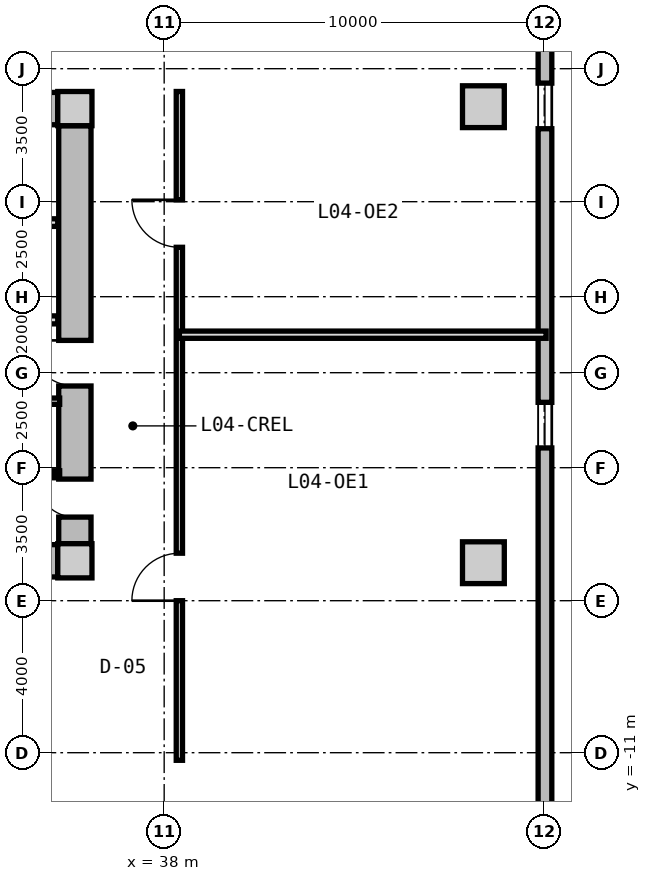
"""IFC4 building model, lengths in metres.
Left out: names, types, materials, properties, quantities, classifications, styles, units other than length and angle.
Written with IfcOpenShell. Run it as: python <this file> out.ifc"""

import sys

from ifc_helpers import new_model, si_unit, direction, frame, frame_2d, origin, origin_2d, place, context, subcontext, project, spatial, rectangle, extrude, source, transform, mapped, element, fill, save


model = new_model("IFC4")
c1 = context("Model", 3, precision=1e-05, world=origin(), true_north=direction((0.0, 1.0)))
c2 = subcontext(c1, "Body", "Model", "MODEL_VIEW")
j1 = project(units=[si_unit("LENGTHUNIT", "METRE"), si_unit("PLANEANGLEUNIT", "RADIAN")], contexts=[c1])
p1 = place(None, origin())
s1 = spatial("IfcSite", under=j1, at=p1, CompositionType="ELEMENT")
p2 = place(p1, origin())
s2 = spatial("IfcBuilding", under=s1, at=p2, CompositionType="ELEMENT")
p3 = place(p2, frame((0.0, 0.0, 16.8)))
s3 = spatial("IfcBuildingStorey", under=s2, at=p3, CompositionType="ELEMENT", Elevation=16.8)
m1 = source(origin(), c2, "Body", "SweptSolid", [
    extrude(rectangle(XDim=0.9, YDim=0.9, at=origin_2d()), origin(), (0.0, 0.0, 1.0), 4.8),
])
for number, where, z_axis, x_axis in (
    (1, (35.65, -5.95, 0.0), (0.0, 0.0, 1.0), (1.0, 0.0, 0.0)),
    (2, (35.65, 5.95, 0.0), (0.0, 0.0, 1.0), (1.0, 0.0, 0.0)),
):
    element("IfcColumn", number, at=place(p3, frame(where, z_axis=z_axis, x_axis=x_axis)), inside=s3, PredefinedType="COLUMN", context=c2, shape_type="MappedRepresentation", body=[
        mapped(m1, transform((0.0, 0.0, 0.0), x_axis=(1.0, 0.0, 0.0), y_axis=(0.0, 1.0, 0.0), z_axis=(0.0, 0.0, 1.0), scale=1.0)),
    ])
m2 = source(origin(), c2, "Body", "SweptSolid", [
    extrude(rectangle(XDim=14.4, YDim=0.85, at=frame_2d((7.2, 0.0))), origin(), (0.0, 0.0, 1.0), 4.38),
])
for number, where, z_axis, x_axis in (
    (3, (20.8, 5.95, 0.0), (0.0, 0.0, 1.0), (1.0, 0.0, 0.0)),
    (4, (35.2, -5.95, 0.0), (0.0, 0.0, 1.0), (-1.0, 0.0, 0.0)),
):
    element("IfcWall", number, at=place(p3, frame(where, z_axis=z_axis, x_axis=x_axis)), inside=s3, PredefinedType="SHEAR", context=c2, shape_type="MappedRepresentation", body=[
        mapped(m2, transform((0.0, 0.0, 0.0), x_axis=(1.0, 0.0, 0.0), y_axis=(0.0, 1.0, 0.0), z_axis=(0.0, 0.0, 1.0), scale=1.0)),
    ])
m3 = source(origin(), c2, "Body", "SweptSolid", [
    extrude(rectangle(XDim=11.0, YDim=0.85, at=frame_2d((5.5, 0.0))), origin(), (0.0, 0.0, 1.0), 4.38),
])
p4 = place(p3, frame((35.65, 5.5, 0.0), z_axis=(0.0, 0.0, 1.0), x_axis=(0.0, -1.0, 0.0)))
e5 = element("IfcWall", 5, at=p4, inside=s3, PredefinedType="SHEAR", context=c2, shape_type="MappedRepresentation", body=[
    mapped(m3, transform((0.0, 0.0, 0.0), x_axis=(1.0, 0.0, 0.0), y_axis=(0.0, 1.0, 0.0), z_axis=(0.0, 0.0, 1.0), scale=1.0)),
])
p5 = place(p4, frame((5.65, 0.0, 0.0)))
e6 = element("IfcOpeningElement", 6, at=p5, cuts=e5, PredefinedType="OPENING", context=c2, shape_type="SweptSolid", body=[
    extrude(rectangle(XDim=1.2, YDim=2.15, at=frame_2d((0.6, 1.075))), frame((0.0, 0.435, 0.0), z_axis=(0.0, -1.0, 0.0), x_axis=(1.0, 0.0, 0.0)), (0.0, 0.0, 1.0), 0.87),
])
p6 = place(p4, frame((9.3, 0.0, 0.0)))
e7 = element("IfcOpeningElement", 7, at=p6, cuts=e5, PredefinedType="OPENING", context=c2, shape_type="SweptSolid", body=[
    extrude(rectangle(XDim=1.0, YDim=2.1, at=frame_2d((0.5, 1.05))), frame((0.0, 0.435, 0.0), z_axis=(0.0, -1.0, 0.0), x_axis=(1.0, 0.0, 0.0)), (0.0, 0.0, 1.0), 0.87),
])
m4 = source(origin(), c2, "Body", "SweptSolid", [
    extrude(rectangle(XDim=1.1, YDim=1.1, at=origin_2d()), origin(), (0.0, 0.0, 1.0), 4.38),
])
for number, where, z_axis, x_axis in (
    (8, (46.4, -6.0, 0.0), (0.0, 0.0, 1.0), (1.0, 0.0, 0.0)),
    (9, (46.4, 6.0, 0.0), (0.0, 0.0, 1.0), (1.0, 0.0, 0.0)),
):
    element("IfcColumn", number, at=place(p3, frame(where, z_axis=z_axis, x_axis=x_axis)), inside=s3, PredefinedType="COLUMN", context=c2, shape_type="MappedRepresentation", body=[
        mapped(m4, transform((0.0, 0.0, 0.0), x_axis=(1.0, 0.0, 0.0), y_axis=(0.0, 1.0, 0.0), z_axis=(0.0, 0.0, 1.0), scale=1.0)),
    ])
m5 = source(origin(), c2, "Body", "SweptSolid", [
    extrude(rectangle(XDim=38.04, YDim=0.36, at=frame_2d((19.02, 0.0))), origin(), (0.0, 0.0, 1.0), 4.38),
])
p7 = place(p3, frame((48.02, 19.02, 0.0), z_axis=(0.0, 0.0, 1.0), x_axis=(0.0, -1.0, 0.0)))
e10 = element("IfcWall", 10, at=p7, inside=s3, PredefinedType="SOLIDWALL", context=c2, shape_type="MappedRepresentation", body=[
    mapped(m5, transform((0.0, 0.0, 0.0), x_axis=(1.0, 0.0, 0.0), y_axis=(0.0, 1.0, 0.0), z_axis=(0.0, 0.0, 1.0), scale=1.0)),
])
p8 = place(p7, frame((4.0, 0.0, 0.85)))
e11 = element("IfcOpeningElement", 11, at=p8, cuts=e10, PredefinedType="OPENING", context=c2, shape_type="SweptSolid", body=[
    extrude(rectangle(XDim=1.2, YDim=1.5, at=frame_2d((0.6, 0.75))), frame((0.0, 0.19, 0.0), z_axis=(0.0, -1.0, 0.0), x_axis=(1.0, 0.0, 0.0)), (0.0, 0.0, 1.0), 0.38),
])
p9 = place(p7, frame((12.4, 0.0, 0.85)))
e12 = element("IfcOpeningElement", 12, at=p9, cuts=e10, PredefinedType="OPENING", context=c2, shape_type="SweptSolid", body=[
    extrude(rectangle(XDim=1.2, YDim=1.5, at=frame_2d((0.6, 0.75))), frame((0.0, 0.19, 0.0), z_axis=(0.0, -1.0, 0.0), x_axis=(1.0, 0.0, 0.0)), (0.0, 0.0, 1.0), 0.38),
])
p10 = place(p7, frame((20.8, 0.0, 0.85)))
e13 = element("IfcOpeningElement", 13, at=p10, cuts=e10, PredefinedType="OPENING", context=c2, shape_type="SweptSolid", body=[
    extrude(rectangle(XDim=1.2, YDim=1.5, at=frame_2d((0.6, 0.75))), frame((0.0, 0.19, 0.0), z_axis=(0.0, -1.0, 0.0), x_axis=(1.0, 0.0, 0.0)), (0.0, 0.0, 1.0), 0.38),
])
m6 = source(origin(), c2, "Body", "SweptSolid", [
    extrude(rectangle(XDim=3.2, YDim=0.2, at=frame_2d((1.6, 0.0))), origin(), (0.0, 0.0, 1.0), 4.365),
])
p11 = place(p3, frame((32.0, 2.95, 0.0), z_axis=(0.0, 0.0, 1.0), x_axis=(1.0, 0.0, 0.0)))
e14 = element("IfcWall", 14, at=p11, inside=s3, PredefinedType="PARTITIONING", context=c2, shape_type="MappedRepresentation", body=[
    mapped(m6, transform((0.0, 0.0, 0.0), x_axis=(1.0, 0.0, 0.0), y_axis=(0.0, 1.0, 0.0), z_axis=(0.0, 0.0, 1.0), scale=1.0)),
])
m7 = source(origin(), c2, "Body", "SweptSolid", [
    extrude(rectangle(XDim=6.66, YDim=0.21, at=frame_2d((3.33, 0.0))), origin(), (0.0, 0.0, 1.0), 4.365),
])
p12 = place(p3, frame((28.54, 0.39, 0.0), z_axis=(0.0, 0.0, 1.0), x_axis=(1.0, 0.0, 0.0)))
e15 = element("IfcWall", 15, at=p12, inside=s3, PredefinedType="PARTITIONING", context=c2, shape_type="MappedRepresentation", body=[
    mapped(m7, transform((0.0, 0.0, 0.0), x_axis=(1.0, 0.0, 0.0), y_axis=(0.0, 1.0, 0.0), z_axis=(0.0, 0.0, 1.0), scale=1.0)),
])
p13 = place(p12, frame((1.0, 0.0, 0.0)))
e16 = element("IfcOpeningElement", 16, at=p13, cuts=e15, PredefinedType="OPENING", context=c2, shape_type="SweptSolid", body=[
    extrude(rectangle(XDim=1.2, YDim=2.15, at=frame_2d((0.6, 1.075))), frame((0.0, 0.115, 0.0), z_axis=(0.0, -1.0, 0.0), x_axis=(1.0, 0.0, 0.0)), (0.0, 0.0, 1.0), 0.23),
])
m8 = source(origin(), c2, "Body", "SweptSolid", [
    extrude(rectangle(XDim=2.7, YDim=0.165, at=frame_2d((1.35, 0.0))), origin(), (0.0, 0.0, 1.0), 4.365),
])
p14 = place(p3, frame((32.55, -1.75, 0.0), z_axis=(0.0, 0.0, 1.0), x_axis=(1.0, 0.0, 0.0)))
e17 = element("IfcWall", 17, at=p14, inside=s3, PredefinedType="PARTITIONING", context=c2, shape_type="MappedRepresentation", body=[
    mapped(m8, transform((0.0, 0.0, 0.0), x_axis=(1.0, 0.0, 0.0), y_axis=(0.0, 1.0, 0.0), z_axis=(0.0, 0.0, 1.0), scale=1.0)),
])
p15 = place(p14, frame((0.85, 0.0, 0.0)))
e18 = element("IfcOpeningElement", 18, at=p15, cuts=e17, PredefinedType="OPENING", context=c2, shape_type="SweptSolid", body=[
    extrude(rectangle(XDim=0.925, YDim=2.1, at=frame_2d((0.462, 1.05))), frame((0.0, 0.093, 0.0), z_axis=(0.0, -1.0, 0.0), x_axis=(1.0, 0.0, 0.0)), (0.0, 0.0, 1.0), 0.185),
])
m9 = source(origin(), c2, "Body", "SweptSolid", [
    extrude(rectangle(XDim=2.7, YDim=0.14, at=frame_2d((1.35, 0.0))), origin(), (0.0, 0.0, 1.0), 4.365),
])
p16 = place(p3, frame((32.55, -3.65, 0.0), z_axis=(0.0, 0.0, 1.0), x_axis=(1.0, 0.0, 0.0)))
e19 = element("IfcWall", 19, at=p16, inside=s3, PredefinedType="PARTITIONING", context=c2, shape_type="MappedRepresentation", body=[
    mapped(m9, transform((0.0, 0.0, 0.0), x_axis=(1.0, 0.0, 0.0), y_axis=(0.0, 1.0, 0.0), z_axis=(0.0, 0.0, 1.0), scale=1.0)),
])
m10 = source(origin(), c2, "Body", "SweptSolid", [
    extrude(rectangle(XDim=17.6, YDim=0.165, at=frame_2d((8.8, 0.0))), origin(), (0.0, 0.0, 1.0), 4.365),
])
p17 = place(p3, frame((38.4, -11.2, 0.0), z_axis=(0.0, 0.0, 1.0), x_axis=(0.0, 1.0, 0.0)))
e20 = element("IfcWall", 20, at=p17, inside=s3, PredefinedType="PARTITIONING", context=c2, shape_type="MappedRepresentation", body=[
    mapped(m10, transform((0.0, 0.0, 0.0), x_axis=(1.0, 0.0, 0.0), y_axis=(0.0, 1.0, 0.0), z_axis=(0.0, 0.0, 1.0), scale=1.0)),
])
p18 = place(p17, frame((4.2, 0.0, 0.0)))
e21 = element("IfcOpeningElement", 21, at=p18, cuts=e20, PredefinedType="OPENING", context=c2, shape_type="SweptSolid", body=[
    extrude(rectangle(XDim=1.25, YDim=2.2, at=frame_2d((0.625, 1.1))), frame((0.0, 0.093, 0.0), z_axis=(0.0, -1.0, 0.0), x_axis=(1.0, 0.0, 0.0)), (0.0, 0.0, 1.0), 0.185),
])
p19 = place(p17, frame((13.5, 0.0, 0.0)))
e22 = element("IfcOpeningElement", 22, at=p19, cuts=e20, PredefinedType="OPENING", context=c2, shape_type="SweptSolid", body=[
    extrude(rectangle(XDim=1.25, YDim=2.2, at=frame_2d((0.625, 1.1))), frame((0.0, 0.093, 0.0), z_axis=(0.0, -1.0, 0.0), x_axis=(1.0, 0.0, 0.0)), (0.0, 0.0, 1.0), 0.185),
])
m11 = source(origin(), c2, "Body", "SweptSolid", [
    extrude(rectangle(XDim=9.65, YDim=0.19, at=frame_2d((4.825, 0.0))), origin(), (0.0, 0.0, 1.0), 4.365),
])
p20 = place(p3, frame((38.4, 0.0, 0.0), z_axis=(0.0, 0.0, 1.0), x_axis=(1.0, 0.0, 0.0)))
e23 = element("IfcWall", 23, at=p20, inside=s3, PredefinedType="PARTITIONING", context=c2, shape_type="MappedRepresentation", body=[
    mapped(m11, transform((0.0, 0.0, 0.0), x_axis=(1.0, 0.0, 0.0), y_axis=(0.0, 1.0, 0.0), z_axis=(0.0, 0.0, 1.0), scale=1.0)),
])
m12 = source(origin(), c2, "Body", "SweptSolid", [
    extrude(rectangle(XDim=1.2, YDim=1.5, at=frame_2d((0.6, 0.75))), frame((0.0, 0.03, 0.0), z_axis=(0.0, -1.0, 0.0), x_axis=(1.0, 0.0, 0.0)), (0.0, 0.0, 1.0), 0.06),
])
p21 = place(p9, origin())
e24 = element("IfcWindow", 24, at=p21, inside=s3, PartitioningType="SINGLE_PANEL", PredefinedType="WINDOW", context=c2, shape_type="MappedRepresentation", body=[
    mapped(m12, transform((0.0, 0.0, 0.0), x_axis=(1.0, 0.0, 0.0), y_axis=(0.0, 1.0, 0.0), z_axis=(0.0, 0.0, 1.0), scale=1.0)),
])
fill(e12, e24)
p22 = place(p10, origin())
e25 = element("IfcWindow", 25, at=p22, inside=s3, PartitioningType="SINGLE_PANEL", PredefinedType="WINDOW", context=c2, shape_type="MappedRepresentation", body=[
    mapped(m12, transform((0.0, 0.0, 0.0), x_axis=(1.0, 0.0, 0.0), y_axis=(0.0, 1.0, 0.0), z_axis=(0.0, 0.0, 1.0), scale=1.0)),
])
fill(e13, e25)
m13 = source(origin(), c2, "Body", "SweptSolid", [
    extrude(rectangle(XDim=1.2, YDim=2.15, at=frame_2d((0.6, 1.075))), frame((0.0, 0.025, 0.0), z_axis=(0.0, -1.0, 0.0), x_axis=(1.0, 0.0, 0.0)), (0.0, 0.0, 1.0), 0.05),
])
p23 = place(p5, frame((1.2, 0.0, 0.0), z_axis=(0.0, 0.0, 1.0), x_axis=(-1.0, 0.0, 0.0)))
e26 = element("IfcDoor", 26, at=p23, inside=s3, OperationType="SINGLE_SWING_RIGHT", PredefinedType="DOOR", context=c2, shape_type="MappedRepresentation", body=[
    mapped(m13, transform((0.0, 0.0, 0.0), x_axis=(1.0, 0.0, 0.0), y_axis=(0.0, 1.0, 0.0), z_axis=(0.0, 0.0, 1.0), scale=1.0)),
])
fill(e6, e26)
m14 = source(origin(), c2, "Body", "SweptSolid", [
    extrude(rectangle(XDim=1.0, YDim=2.1, at=frame_2d((0.5, 1.05))), frame((0.0, 0.025, 0.0), z_axis=(0.0, -1.0, 0.0), x_axis=(1.0, 0.0, 0.0)), (0.0, 0.0, 1.0), 0.05),
])
p24 = place(p6, frame((1.0, 0.0, 0.0), z_axis=(0.0, 0.0, 1.0), x_axis=(-1.0, 0.0, 0.0)))
e27 = element("IfcDoor", 27, at=p24, inside=s3, OperationType="SINGLE_SWING_RIGHT", PredefinedType="DOOR", context=c2, shape_type="MappedRepresentation", body=[
    mapped(m14, transform((0.0, 0.0, 0.0), x_axis=(1.0, 0.0, 0.0), y_axis=(0.0, 1.0, 0.0), z_axis=(0.0, 0.0, 1.0), scale=1.0)),
])
fill(e7, e27)
m15 = source(origin(), c2, "Body", "SweptSolid", [
    extrude(rectangle(XDim=1.25, YDim=2.2, at=frame_2d((0.625, 1.1))), frame((0.0, 0.025, 0.0), z_axis=(0.0, -1.0, 0.0), x_axis=(1.0, 0.0, 0.0)), (0.0, 0.0, 1.0), 0.05),
])
p25 = place(p18, origin())
e28 = element("IfcDoor", 28, at=p25, inside=s3, OperationType="SINGLE_SWING_LEFT", PredefinedType="DOOR", context=c2, shape_type="MappedRepresentation", body=[
    mapped(m15, transform((0.0, 0.0, 0.0), x_axis=(1.0, 0.0, 0.0), y_axis=(0.0, 1.0, 0.0), z_axis=(0.0, 0.0, 1.0), scale=1.0)),
])
fill(e21, e28)
p26 = place(p19, origin())
e29 = element("IfcDoor", 29, at=p26, inside=s3, OperationType="SINGLE_SWING_RIGHT", PredefinedType="DOOR", context=c2, shape_type="MappedRepresentation", body=[
    mapped(m15, transform((0.0, 0.0, 0.0), x_axis=(1.0, 0.0, 0.0), y_axis=(0.0, 1.0, 0.0), z_axis=(0.0, 0.0, 1.0), scale=1.0)),
])
fill(e22, e29)
save(model, sys.argv[1])
